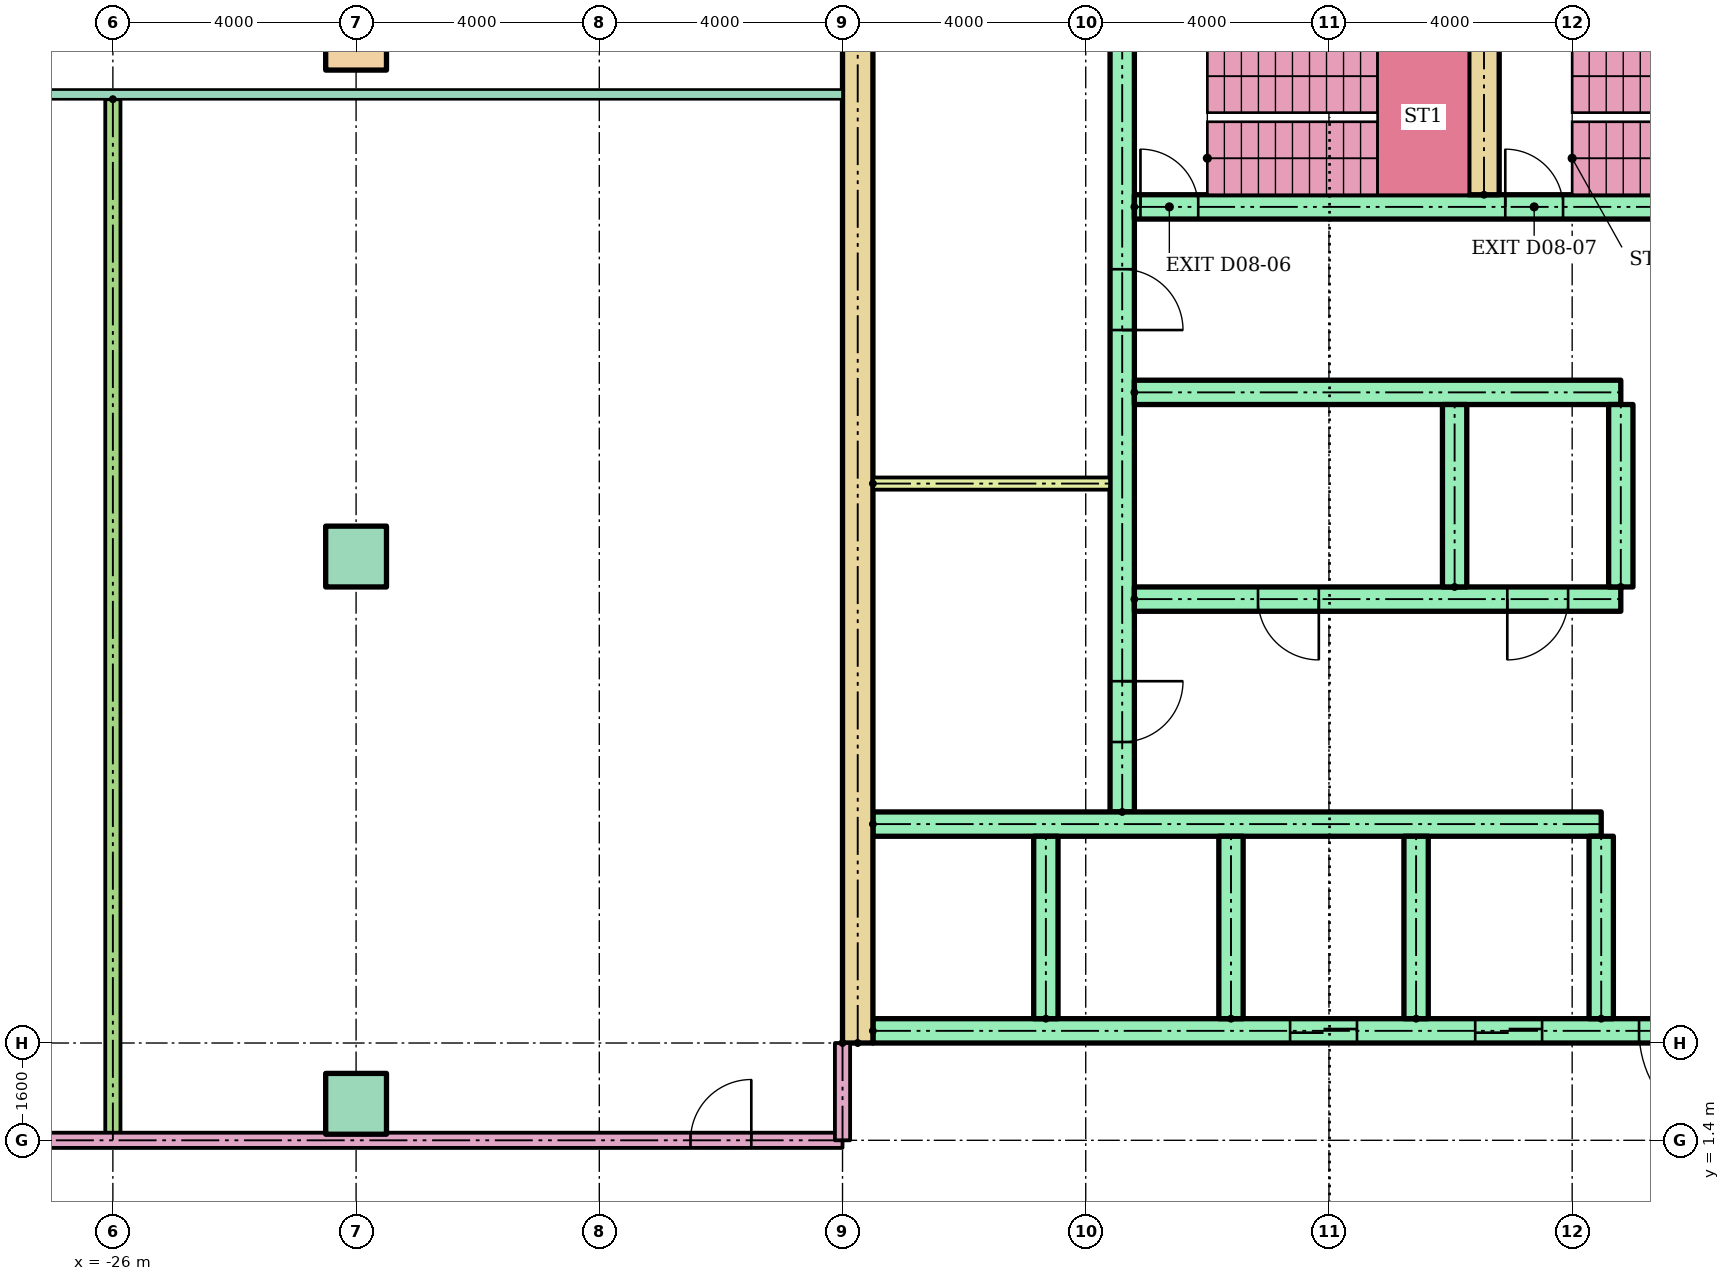
"""IFC4 building model, lengths in metres.
Left out: names, types, materials, properties, quantities, classifications, styles, units other than length and angle.
Written with IfcOpenShell. Run it as: python <this file> out.ifc"""

import sys

from ifc_helpers import new_model, si_unit, direction, frame, frame_2d, origin, origin_2d, place, context, subcontext, project, spatial, rectangle, hollow_rectangle, extrude, element, fill, save


model = new_model("IFC4")
c1 = context("Model", 3, precision=1e-05, world=origin(), true_north=direction((0.0, 1.0)))
c2 = subcontext(c1, "Body", "Model", "MODEL_VIEW")
j1 = project(units=[si_unit("LENGTHUNIT", "METRE"), si_unit("PLANEANGLEUNIT", "RADIAN")], contexts=[c1])
p1 = place(None, origin())
s1 = spatial("IfcSite", under=j1, at=p1, CompositionType="ELEMENT")
p2 = place(p1, origin())
s2 = spatial("IfcBuilding", under=s1, at=p2, CompositionType="ELEMENT")
p3 = place(p2, frame((0.0, 0.0, 33.8)))
s3 = spatial("IfcBuildingStorey", under=s2, at=p3, CompositionType="ELEMENT", Elevation=33.8)
for number, where in (
    (1, (-22.0, 2.0, 0.0)),
    (2, (-22.0, 11.0, 0.0)),
):
    element("IfcColumn", number, at=place(p3, frame(where)), inside=s3, PredefinedType="COLUMN", context=c2, shape_type="SweptSolid", body=[
        extrude(rectangle(XDim=1.0, YDim=1.0, at=origin_2d()), origin(), (0.0, 0.0, 1.0), 3.9),
    ])
p4 = place(p3, frame((-22.0, 19.5, 0.0)))
e3 = element("IfcColumn", 3, at=p4, inside=s3, PredefinedType="COLUMN", context=c2, shape_type="SweptSolid", body=[
    extrude(hollow_rectangle(XDim=1.0, YDim=1.0, WallThickness=0.05, at=origin_2d()), origin(), (0.0, 0.0, 1.0), 3.9),
])
p5 = place(p3, frame((-13.75, 3.0, 0.0), z_axis=(0.0, 0.0, 1.0), x_axis=(0.0, 1.0, 0.0)))
e4 = element("IfcWall", 4, at=p5, inside=s3, PredefinedType="SHEAR", context=c2, shape_type="SweptSolid", body=[
    extrude(rectangle(XDim=17.0, YDim=0.5, at=frame_2d((8.5, 0.0))), origin(), (0.0, 0.0, 1.0), 3.6),
])
p6 = place(p3, frame((-9.4, 6.8, 0.0), z_axis=(0.0, 0.0, 1.0), x_axis=(0.0, 1.0, 0.0)))
e5 = element("IfcWall", 5, at=p6, inside=s3, PredefinedType="SHEAR", context=c2, shape_type="SweptSolid", body=[
    extrude(rectangle(XDim=12.7, YDim=0.4, at=frame_2d((6.35, 0.0))), origin(), (0.0, 0.0, 1.0), 3.6),
])
p7 = place(p6, frame((1.15, 0.0, 0.0)))
e6 = element("IfcOpeningElement", 6, at=p7, cuts=e5, PredefinedType="OPENING", context=c2, shape_type="SweptSolid", body=[
    extrude(rectangle(XDim=1.0, YDim=2.1, at=frame_2d((0.5, 1.05))), frame((0.0, 0.21, 0.0), z_axis=(0.0, -1.0, 0.0), x_axis=(1.0, 0.0, 0.0)), (0.0, 0.0, 1.0), 0.42),
])
p8 = place(p6, frame((7.925, 0.0, 0.0)))
e7 = element("IfcOpeningElement", 7, at=p8, cuts=e5, PredefinedType="OPENING", context=c2, shape_type="SweptSolid", body=[
    extrude(rectangle(XDim=1.0, YDim=2.1, at=frame_2d((0.5, 1.05))), frame((0.0, 0.21, 0.0), z_axis=(0.0, -1.0, 0.0), x_axis=(1.0, 0.0, 0.0)), (0.0, 0.0, 1.0), 0.42),
])
p9 = place(p3, frame((-13.5, 3.2, 0.0)))
e8 = element("IfcWall", 8, at=p9, inside=s3, PredefinedType="SHEAR", context=c2, shape_type="SweptSolid", body=[
    extrude(rectangle(XDim=27.0, YDim=0.4, at=frame_2d((13.5, 0.0))), origin(), (0.0, 0.0, 1.0), 3.6),
])
p10 = place(p9, frame((6.861, 0.0, 0.0)))
e9 = element("IfcOpeningElement", 9, at=p10, cuts=e8, PredefinedType="OPENING", context=c2, shape_type="SweptSolid", body=[
    extrude(rectangle(XDim=1.1, YDim=2.1, at=frame_2d((0.55, 1.05))), frame((0.0, 0.21, 0.0), z_axis=(0.0, -1.0, 0.0), x_axis=(1.0, 0.0, 0.0)), (0.0, 0.0, 1.0), 0.42),
])
p11 = place(p9, frame((9.906, 0.0, 0.0)))
e10 = element("IfcOpeningElement", 10, at=p11, cuts=e8, PredefinedType="OPENING", context=c2, shape_type="SweptSolid", body=[
    extrude(rectangle(XDim=1.1, YDim=2.1, at=frame_2d((0.55, 1.05))), frame((0.0, 0.21, 0.0), z_axis=(0.0, -1.0, 0.0), x_axis=(1.0, 0.0, 0.0)), (0.0, 0.0, 1.0), 0.42),
])
p12 = place(p9, frame((15.994, 0.0, 0.0)))
e11 = element("IfcOpeningElement", 11, at=p12, cuts=e8, PredefinedType="OPENING", context=c2, shape_type="SweptSolid", body=[
    extrude(rectangle(XDim=1.1, YDim=2.1, at=frame_2d((0.55, 1.05))), frame((0.0, 0.21, 0.0), z_axis=(0.0, -1.0, 0.0), x_axis=(1.0, 0.0, 0.0)), (0.0, 0.0, 1.0), 0.42),
])
p13 = place(p9, frame((19.039, 0.0, 0.0)))
e12 = element("IfcOpeningElement", 12, at=p13, cuts=e8, PredefinedType="OPENING", context=c2, shape_type="SweptSolid", body=[
    extrude(rectangle(XDim=1.1, YDim=2.1, at=frame_2d((0.55, 1.05))), frame((0.0, 0.21, 0.0), z_axis=(0.0, -1.0, 0.0), x_axis=(1.0, 0.0, 0.0)), (0.0, 0.0, 1.0), 0.42),
])
p14 = place(p9, frame((12.6, 0.0, 0.0)))
e13 = element("IfcOpeningElement", 13, at=p14, cuts=e8, PredefinedType="OPENING", context=c2, shape_type="SweptSolid", body=[
    extrude(rectangle(XDim=1.8, YDim=2.1, at=frame_2d((0.9, 1.05))), frame((0.0, 0.21, 0.0), z_axis=(0.0, -1.0, 0.0), x_axis=(1.0, 0.0, 0.0)), (0.0, 0.0, 1.0), 0.42),
])
p15 = place(p3, frame((-13.5, 6.6, 0.0)))
e14 = element("IfcWall", 14, at=p15, inside=s3, PredefinedType="SHEAR", context=c2, shape_type="SweptSolid", body=[
    extrude(rectangle(XDim=11.978, YDim=0.4, at=frame_2d((5.989, 0.0))), origin(), (0.0, 0.0, 1.0), 3.6),
])
for number, where, z_axis, x_axis in (
    (15, (-10.656, 3.4, 0.0), (0.0, 0.0, 1.0), (0.0, 1.0, 0.0)),
    (16, (-7.611, 3.4, 0.0), (0.0, 0.0, 1.0), (0.0, 1.0, 0.0)),
    (17, (-4.567, 3.4, 0.0), (0.0, 0.0, 1.0), (0.0, 1.0, 0.0)),
    (18, (-1.522, 3.4, 0.0), (0.0, 0.0, 1.0), (0.0, 1.0, 0.0)),
):
    element("IfcWall", number, at=place(p3, frame(where, z_axis=z_axis, x_axis=x_axis)), inside=s3, PredefinedType="SHEAR", context=c2, shape_type="SweptSolid", body=[
        extrude(rectangle(XDim=3.0, YDim=0.4, at=frame_2d((1.5, 0.0))), origin(), (0.0, 0.0, 1.0), 3.6),
    ])
p16 = place(p3, frame((-9.2, 10.3, 0.0)))
e19 = element("IfcWall", 19, at=p16, inside=s3, PredefinedType="SHEAR", context=c2, shape_type="SweptSolid", body=[
    extrude(rectangle(XDim=8.0, YDim=0.4, at=frame_2d((4.0, 0.0))), origin(), (0.0, 0.0, 1.0), 3.6),
])
p17 = place(p16, frame((2.033, 0.0, 0.0)))
e20 = element("IfcOpeningElement", 20, at=p17, cuts=e19, PredefinedType="OPENING", context=c2, shape_type="SweptSolid", body=[
    extrude(rectangle(XDim=1.0, YDim=2.1, at=frame_2d((0.5, 1.05))), frame((0.0, 0.21, 0.0), z_axis=(0.0, -1.0, 0.0), x_axis=(1.0, 0.0, 0.0)), (0.0, 0.0, 1.0), 0.42),
])
p18 = place(p16, frame((6.133, 0.0, 0.0)))
e21 = element("IfcOpeningElement", 21, at=p18, cuts=e19, PredefinedType="OPENING", context=c2, shape_type="SweptSolid", body=[
    extrude(rectangle(XDim=1.0, YDim=2.1, at=frame_2d((0.5, 1.05))), frame((0.0, 0.21, 0.0), z_axis=(0.0, -1.0, 0.0), x_axis=(1.0, 0.0, 0.0)), (0.0, 0.0, 1.0), 0.42),
])
p19 = place(p3, frame((-9.2, 13.7, 0.0)))
e22 = element("IfcWall", 22, at=p19, inside=s3, PredefinedType="SHEAR", context=c2, shape_type="SweptSolid", body=[
    extrude(rectangle(XDim=8.0, YDim=0.4, at=frame_2d((4.0, 0.0))), origin(), (0.0, 0.0, 1.0), 3.6),
])
for number, where, z_axis, x_axis in (
    (23, (-3.933, 10.5, 0.0), (0.0, 0.0, 1.0), (0.0, 1.0, 0.0)),
    (24, (-1.2, 10.5, 0.0), (0.0, 0.0, 1.0), (0.0, 1.0, 0.0)),
):
    element("IfcWall", number, at=place(p3, frame(where, z_axis=z_axis, x_axis=x_axis)), inside=s3, PredefinedType="SHEAR", context=c2, shape_type="SweptSolid", body=[
        extrude(rectangle(XDim=3.0, YDim=0.4, at=frame_2d((1.5, 0.0))), origin(), (0.0, 0.0, 1.0), 3.6),
    ])
p20 = place(p3, frame((-9.2, 16.75, 0.0)))
e25 = element("IfcWall", 25, at=p20, inside=s3, PredefinedType="SHEAR", context=c2, shape_type="SweptSolid", body=[
    extrude(rectangle(XDim=18.4, YDim=0.4, at=frame_2d((9.2, 0.0))), origin(), (0.0, 0.0, 1.0), 3.6),
])
p21 = place(p20, frame((0.1, 0.0, 0.0)))
e26 = element("IfcOpeningElement", 26, at=p21, cuts=e25, PredefinedType="OPENING", context=c2, shape_type="SweptSolid", body=[
    extrude(rectangle(XDim=0.95, YDim=2.1, at=frame_2d((0.475, 1.05))), frame((0.0, 0.21, 0.0), z_axis=(0.0, -1.0, 0.0), x_axis=(1.0, 0.0, 0.0)), (0.0, 0.0, 1.0), 0.42),
])
p22 = place(p20, frame((6.1, 0.0, 0.0)))
e27 = element("IfcOpeningElement", 27, at=p22, cuts=e25, PredefinedType="OPENING", context=c2, shape_type="SweptSolid", body=[
    extrude(rectangle(XDim=0.95, YDim=2.1, at=frame_2d((0.475, 1.05))), frame((0.0, 0.21, 0.0), z_axis=(0.0, -1.0, 0.0), x_axis=(1.0, 0.0, 0.0)), (0.0, 0.0, 1.0), 0.42),
])
p23 = place(p20, frame((12.1, 0.0, 0.0)))
e28 = element("IfcOpeningElement", 28, at=p23, cuts=e25, PredefinedType="OPENING", context=c2, shape_type="SweptSolid", body=[
    extrude(rectangle(XDim=0.95, YDim=2.1, at=frame_2d((0.475, 1.05))), frame((0.0, 0.21, 0.0), z_axis=(0.0, -1.0, 0.0), x_axis=(1.0, 0.0, 0.0)), (0.0, 0.0, 1.0), 0.42),
])
p24 = place(p3, frame((-3.45, 16.95, 0.0), z_axis=(0.0, 0.0, 1.0), x_axis=(0.0, 1.0, 0.0)))
e29 = element("IfcWall", 29, at=p24, inside=s3, PredefinedType="SHEAR", context=c2, shape_type="SweptSolid", body=[
    extrude(rectangle(XDim=2.55, YDim=0.5, at=frame_2d((1.275, 0.0))), origin(), (0.0, 0.0, 1.0), 3.6),
])
p25 = place(p3, frame((-13.5, 12.2, 0.0)))
e30 = element("IfcWall", 30, at=p25, inside=s3, PredefinedType="PARTITIONING", context=c2, shape_type="SweptSolid", body=[
    extrude(rectangle(XDim=3.9, YDim=0.2, at=frame_2d((1.95, 0.0))), origin(), (0.0, 0.0, 1.0), 3.6),
])
p26 = place(p3, frame((-29.0, 1.4, 0.0)))
e31 = element("IfcWall", 31, at=p26, inside=s3, PredefinedType="PARTITIONING", context=c2, shape_type="SweptSolid", body=[
    extrude(rectangle(XDim=15.0, YDim=0.25, at=frame_2d((7.5, 0.0))), origin(), (0.0, 0.0, 1.0), 3.1),
])
p27 = place(p26, frame((12.5, 0.0, 0.0)))
e32 = element("IfcOpeningElement", 32, at=p27, cuts=e31, PredefinedType="OPENING", context=c2, shape_type="SweptSolid", body=[
    extrude(rectangle(XDim=1.0, YDim=2.1, at=frame_2d((0.5, 1.05))), frame((0.0, 0.135, 0.0), z_axis=(0.0, -1.0, 0.0), x_axis=(1.0, 0.0, 0.0)), (0.0, 0.0, 1.0), 0.27),
])
p28 = place(p26, frame((0.5, 0.0, 0.0)))
e33 = element("IfcOpeningElement", 33, at=p28, cuts=e31, PredefinedType="OPENING", context=c2, shape_type="SweptSolid", body=[
    extrude(rectangle(XDim=1.0, YDim=2.1, at=frame_2d((0.5, 1.05))), frame((0.0, 0.135, 0.0), z_axis=(0.0, -1.0, 0.0), x_axis=(1.0, 0.0, 0.0)), (0.0, 0.0, 1.0), 0.27),
])
p29 = place(p3, frame((-26.0, 18.521, 0.0), z_axis=(0.0, 0.0, 1.0), x_axis=(0.0, -1.0, 0.0)))
e34 = element("IfcWall", 34, at=p29, inside=s3, PredefinedType="PARTITIONING", context=c2, shape_type="SweptSolid", body=[
    extrude(rectangle(XDim=17.121, YDim=0.25, at=frame_2d((8.561, 0.0))), origin(), (0.0, 0.0, 1.0), 3.1),
])
p30 = place(p3, frame((-14.0, 3.0, 0.0), z_axis=(0.0, 0.0, 1.0), x_axis=(0.0, -1.0, 0.0)))
e35 = element("IfcWall", 35, at=p30, inside=s3, PredefinedType="PARTITIONING", context=c2, shape_type="SweptSolid", body=[
    extrude(rectangle(XDim=1.6, YDim=0.25, at=frame_2d((0.8, 0.0))), origin(), (0.0, 0.0, 1.0), 3.1),
])
p31 = place(p10, origin())
e36 = element("IfcDoor", 36, at=p31, inside=s3, OperationType="SLIDING_TO_LEFT", PredefinedType="DOOR", context=c2, shape_type="SweptSolid", body=[
    extrude(rectangle(XDim=1.1, YDim=2.1, at=frame_2d((0.55, 1.05))), frame((0.0, 0.025, 0.0), z_axis=(0.0, -1.0, 0.0), x_axis=(1.0, 0.0, 0.0)), (0.0, 0.0, 1.0), 0.05),
])
fill(e9, e36)
p32 = place(p11, origin())
e37 = element("IfcDoor", 37, at=p32, inside=s3, OperationType="SLIDING_TO_LEFT", PredefinedType="DOOR", context=c2, shape_type="SweptSolid", body=[
    extrude(rectangle(XDim=1.1, YDim=2.1, at=frame_2d((0.55, 1.05))), frame((0.0, 0.025, 0.0), z_axis=(0.0, -1.0, 0.0), x_axis=(1.0, 0.0, 0.0)), (0.0, 0.0, 1.0), 0.05),
])
fill(e10, e37)
p33 = place(p14, frame((1.8, 0.0, 0.0), z_axis=(0.0, 0.0, 1.0), x_axis=(-1.0, 0.0, 0.0)))
e38 = element("IfcDoor", 38, at=p33, inside=s3, OperationType="DOUBLE_DOOR_SINGLE_SWING", PredefinedType="DOOR", context=c2, shape_type="SweptSolid", body=[
    extrude(rectangle(XDim=1.8, YDim=2.1, at=frame_2d((0.9, 1.05))), frame((0.0, 0.025, 0.0), z_axis=(0.0, -1.0, 0.0), x_axis=(1.0, 0.0, 0.0)), (0.0, 0.0, 1.0), 0.05),
])
fill(e13, e38)
p34 = place(p17, frame((1.0, 0.0, 0.0), z_axis=(0.0, 0.0, 1.0), x_axis=(-1.0, 0.0, 0.0)))
e39 = element("IfcDoor", 39, at=p34, inside=s3, OperationType="SINGLE_SWING_RIGHT", PredefinedType="DOOR", context=c2, shape_type="SweptSolid", body=[
    extrude(rectangle(XDim=1.0, YDim=2.1, at=frame_2d((0.5, 1.05))), frame((0.0, 0.025, 0.0), z_axis=(0.0, -1.0, 0.0), x_axis=(1.0, 0.0, 0.0)), (0.0, 0.0, 1.0), 0.05),
])
fill(e20, e39)
p35 = place(p18, frame((1.0, 0.0, 0.0), z_axis=(0.0, 0.0, 1.0), x_axis=(-1.0, 0.0, 0.0)))
e40 = element("IfcDoor", 40, at=p35, inside=s3, OperationType="SINGLE_SWING_LEFT", PredefinedType="DOOR", context=c2, shape_type="SweptSolid", body=[
    extrude(rectangle(XDim=1.0, YDim=2.1, at=frame_2d((0.5, 1.05))), frame((0.0, 0.025, 0.0), z_axis=(0.0, -1.0, 0.0), x_axis=(1.0, 0.0, 0.0)), (0.0, 0.0, 1.0), 0.05),
])
fill(e21, e40)
p36 = place(p21, origin())
e41 = element("IfcDoor", 41, at=p36, inside=s3, OperationType="SINGLE_SWING_LEFT", PredefinedType="DOOR", context=c2, shape_type="SweptSolid", body=[
    extrude(rectangle(XDim=0.95, YDim=2.1, at=frame_2d((0.475, 1.05))), frame((0.0, 0.025, 0.0), z_axis=(0.0, -1.0, 0.0), x_axis=(1.0, 0.0, 0.0)), (0.0, 0.0, 1.0), 0.05),
])
fill(e26, e41)
p37 = place(p22, origin())
e42 = element("IfcDoor", 42, at=p37, inside=s3, OperationType="SINGLE_SWING_LEFT", PredefinedType="DOOR", context=c2, shape_type="SweptSolid", body=[
    extrude(rectangle(XDim=0.95, YDim=2.1, at=frame_2d((0.475, 1.05))), frame((0.0, 0.025, 0.0), z_axis=(0.0, -1.0, 0.0), x_axis=(1.0, 0.0, 0.0)), (0.0, 0.0, 1.0), 0.05),
])
fill(e27, e42)
p38 = place(p7, frame((1.0, 0.0, 0.0), z_axis=(0.0, 0.0, 1.0), x_axis=(-1.0, 0.0, 0.0)))
e43 = element("IfcDoor", 43, at=p38, inside=s3, OperationType="SINGLE_SWING_RIGHT", PredefinedType="DOOR", context=c2, shape_type="SweptSolid", body=[
    extrude(rectangle(XDim=1.0, YDim=2.1, at=frame_2d((0.5, 1.05))), frame((0.0, 0.025, 0.0), z_axis=(0.0, -1.0, 0.0), x_axis=(1.0, 0.0, 0.0)), (0.0, 0.0, 1.0), 0.05),
])
fill(e6, e43)
p39 = place(p8, frame((1.0, 0.0, 0.0), z_axis=(0.0, 0.0, 1.0), x_axis=(-1.0, 0.0, 0.0)))
e44 = element("IfcDoor", 44, at=p39, inside=s3, OperationType="SINGLE_SWING_LEFT", PredefinedType="DOOR", context=c2, shape_type="SweptSolid", body=[
    extrude(rectangle(XDim=1.0, YDim=2.1, at=frame_2d((0.5, 1.05))), frame((0.0, 0.025, 0.0), z_axis=(0.0, -1.0, 0.0), x_axis=(1.0, 0.0, 0.0)), (0.0, 0.0, 1.0), 0.05),
])
fill(e7, e44)
p40 = place(p27, origin())
e45 = element("IfcDoor", 45, at=p40, inside=s3, OperationType="SINGLE_SWING_RIGHT", PredefinedType="DOOR", context=c2, shape_type="SweptSolid", body=[
    extrude(rectangle(XDim=1.0, YDim=2.1, at=frame_2d((0.5, 1.05))), frame((0.0, 0.025, 0.0), z_axis=(0.0, -1.0, 0.0), x_axis=(1.0, 0.0, 0.0)), (0.0, 0.0, 1.0), 0.05),
])
fill(e32, e45)
save(model, sys.argv[1])
